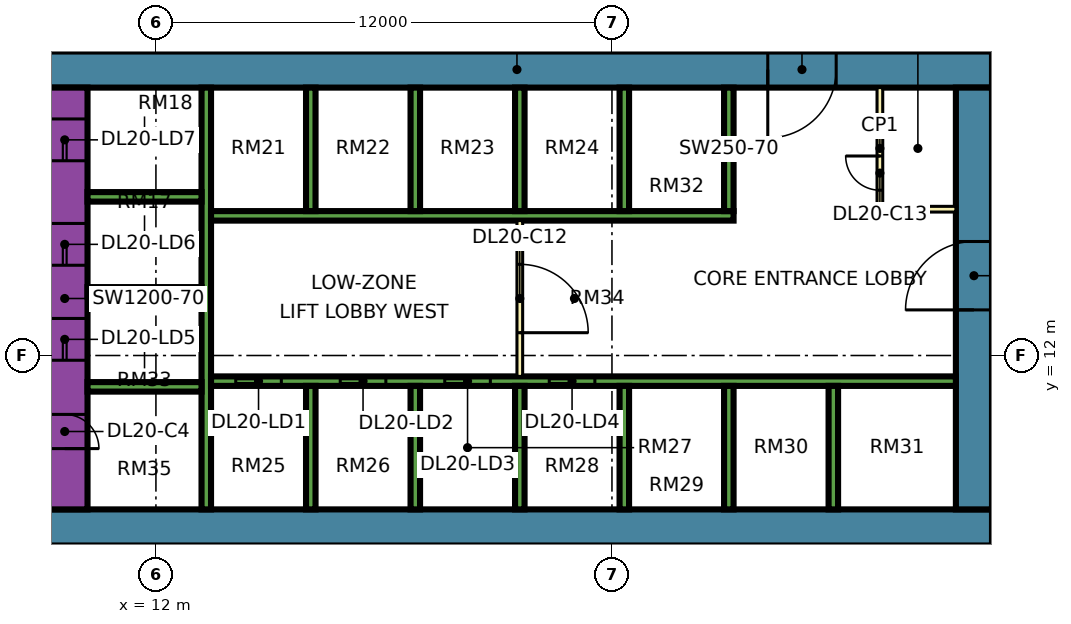
"""IFC4 building model, lengths in metres.
Left out: names, types, materials, properties, quantities, classifications, styles, units other than length and angle.
Written with IfcOpenShell. Run it as: python <this file> out.ifc"""

import sys

from ifc_helpers import new_model, si_unit, direction, frame, frame_2d, origin, place, context, subcontext, project, spatial, rectangle, extrude, element, fill, save


model = new_model("IFC4")
c1 = context("Model", 3, precision=1e-05, world=origin(), true_north=direction((0.0, 1.0)))
c2 = subcontext(c1, "Body", "Model", "MODEL_VIEW")
j1 = project(units=[si_unit("LENGTHUNIT", "METRE"), si_unit("PLANEANGLEUNIT", "RADIAN")], contexts=[c1])
p1 = place(None, origin())
s1 = spatial("IfcSite", under=j1, at=p1, CompositionType="ELEMENT")
p2 = place(p1, origin())
s2 = spatial("IfcBuilding", under=s1, at=p2, CompositionType="ELEMENT")
p3 = place(p2, frame((0.0, 0.0, 91.9)))
s3 = spatial("IfcBuildingStorey", under=s2, at=p3, CompositionType="ELEMENT", Elevation=91.9)
p4 = place(p3, frame((9.0, 7.475, 0.0), z_axis=(0.0, 0.0, 1.0), x_axis=(1.0, 0.0, 0.0)))
e1 = element("IfcWall", 1, at=p4, inside=s3, PredefinedType="SHEAR", context=c2, shape_type="SweptSolid", body=[
    extrude(rectangle(XDim=25.0, YDim=0.95, at=frame_2d((12.5, 0.0))), origin(), (0.0, 0.0, 1.0), 3.75),
])
p5 = place(p3, frame((9.0, 19.525, 0.0), z_axis=(0.0, 0.0, 1.0), x_axis=(1.0, 0.0, 0.0)))
e2 = element("IfcWall", 2, at=p5, inside=s3, PredefinedType="SHEAR", context=c2, shape_type="SweptSolid", body=[
    extrude(rectangle(XDim=25.0, YDim=0.95, at=frame_2d((12.5, 0.0))), origin(), (0.0, 0.0, 1.0), 3.75),
])
p6 = place(p5, frame((19.1, 0.0, 0.0)))
e3 = element("IfcOpeningElement", 3, at=p6, cuts=e2, PredefinedType="OPENING", context=c2, shape_type="SweptSolid", body=[
    extrude(rectangle(XDim=1.8, YDim=2.4, at=frame_2d((0.9, 1.2))), frame((0.0, 0.485, 0.0), z_axis=(0.0, -1.0, 0.0), x_axis=(1.0, 0.0, 0.0)), (0.0, 0.0, 1.0), 0.97),
])
p7 = place(p3, frame((9.6, 7.95, 0.0), z_axis=(0.0, 0.0, 1.0), x_axis=(0.0, 1.0, 0.0)))
e4 = element("IfcWall", 4, at=p7, inside=s3, PredefinedType="SHEAR", context=c2, shape_type="SweptSolid", body=[
    extrude(rectangle(XDim=11.1, YDim=1.2, at=frame_2d((5.55, 0.0))), origin(), (0.0, 0.0, 1.0), 3.75),
])
p8 = place(p7, frame((3.925, 0.0, 0.0)))
e5 = element("IfcOpeningElement", 5, at=p8, cuts=e4, PredefinedType="OPENING", context=c2, shape_type="SweptSolid", body=[
    extrude(rectangle(XDim=1.1, YDim=2.2, at=frame_2d((0.55, 1.1))), frame((0.0, 0.61, 0.0), z_axis=(0.0, -1.0, 0.0), x_axis=(1.0, 0.0, 0.0)), (0.0, 0.0, 1.0), 1.22),
])
p9 = place(p7, frame((6.425, 0.0, 0.0)))
e6 = element("IfcOpeningElement", 6, at=p9, cuts=e4, PredefinedType="OPENING", context=c2, shape_type="SweptSolid", body=[
    extrude(rectangle(XDim=1.1, YDim=2.2, at=frame_2d((0.55, 1.1))), frame((0.0, 0.61, 0.0), z_axis=(0.0, -1.0, 0.0), x_axis=(1.0, 0.0, 0.0)), (0.0, 0.0, 1.0), 1.22),
])
p10 = place(p7, frame((9.175, 0.0, 0.0)))
e7 = element("IfcOpeningElement", 7, at=p10, cuts=e4, PredefinedType="OPENING", context=c2, shape_type="SweptSolid", body=[
    extrude(rectangle(XDim=1.1, YDim=2.2, at=frame_2d((0.55, 1.1))), frame((0.0, 0.61, 0.0), z_axis=(0.0, -1.0, 0.0), x_axis=(1.0, 0.0, 0.0)), (0.0, 0.0, 1.0), 1.22),
])
p11 = place(p7, frame((1.6, 0.0, 0.0)))
e8 = element("IfcOpeningElement", 8, at=p11, cuts=e4, PredefinedType="OPENING", context=c2, shape_type="SweptSolid", body=[
    extrude(rectangle(XDim=0.9, YDim=2.1, at=frame_2d((0.45, 1.05))), frame((0.0, 0.61, 0.0), z_axis=(0.0, -1.0, 0.0), x_axis=(1.0, 0.0, 0.0)), (0.0, 0.0, 1.0), 1.22),
])
p12 = place(p3, frame((33.525, 7.95, 0.0), z_axis=(0.0, 0.0, 1.0), x_axis=(0.0, 1.0, 0.0)))
e9 = element("IfcWall", 9, at=p12, inside=s3, PredefinedType="SHEAR", context=c2, shape_type="SweptSolid", body=[
    extrude(rectangle(XDim=11.1, YDim=0.95, at=frame_2d((5.55, 0.0))), origin(), (0.0, 0.0, 1.0), 3.75),
])
p13 = place(p12, frame((5.25, 0.0, 0.0)))
e10 = element("IfcOpeningElement", 10, at=p13, cuts=e9, PredefinedType="OPENING", context=c2, shape_type="SweptSolid", body=[
    extrude(rectangle(XDim=1.8, YDim=2.4, at=frame_2d((0.9, 1.2))), frame((0.0, 0.485, 0.0), z_axis=(0.0, -1.0, 0.0), x_axis=(1.0, 0.0, 0.0)), (0.0, 0.0, 1.0), 0.97),
])
p14 = place(p3, frame((13.325, 7.95, 0.0), z_axis=(0.0, 0.0, 1.0), x_axis=(0.0, 1.0, 0.0)))
e11 = element("IfcWall", 11, at=p14, inside=s3, PredefinedType="SHEAR", context=c2, shape_type="SweptSolid", body=[
    extrude(rectangle(XDim=11.1, YDim=0.25, at=frame_2d((5.55, 0.0))), origin(), (0.0, 0.0, 1.0), 3.75),
])
p15 = place(p3, frame((13.45, 11.325, 0.0), z_axis=(0.0, 0.0, 1.0), x_axis=(1.0, 0.0, 0.0)))
e12 = element("IfcWall", 12, at=p15, inside=s3, PredefinedType="SHEAR", context=c2, shape_type="SweptSolid", body=[
    extrude(rectangle(XDim=19.6, YDim=0.25, at=frame_2d((9.8, 0.0))), origin(), (0.0, 0.0, 1.0), 3.75),
])
p16 = place(p15, frame((0.65, 0.0, 0.0)))
e13 = element("IfcOpeningElement", 13, at=p16, cuts=e12, PredefinedType="OPENING", context=c2, shape_type="SweptSolid", body=[
    extrude(rectangle(XDim=1.2, YDim=2.2, at=frame_2d((0.6, 1.1))), frame((0.0, 0.135, 0.0), z_axis=(0.0, -1.0, 0.0), x_axis=(1.0, 0.0, 0.0)), (0.0, 0.0, 1.0), 0.27),
])
p17 = place(p15, frame((3.4, 0.0, 0.0)))
e14 = element("IfcOpeningElement", 14, at=p17, cuts=e12, PredefinedType="OPENING", context=c2, shape_type="SweptSolid", body=[
    extrude(rectangle(XDim=1.2, YDim=2.2, at=frame_2d((0.6, 1.1))), frame((0.0, 0.135, 0.0), z_axis=(0.0, -1.0, 0.0), x_axis=(1.0, 0.0, 0.0)), (0.0, 0.0, 1.0), 0.27),
])
p18 = place(p15, frame((6.15, 0.0, 0.0)))
e15 = element("IfcOpeningElement", 15, at=p18, cuts=e12, PredefinedType="OPENING", context=c2, shape_type="SweptSolid", body=[
    extrude(rectangle(XDim=1.2, YDim=2.2, at=frame_2d((0.6, 1.1))), frame((0.0, 0.135, 0.0), z_axis=(0.0, -1.0, 0.0), x_axis=(1.0, 0.0, 0.0)), (0.0, 0.0, 1.0), 0.27),
])
p19 = place(p15, frame((8.9, 0.0, 0.0)))
e16 = element("IfcOpeningElement", 16, at=p19, cuts=e12, PredefinedType="OPENING", context=c2, shape_type="SweptSolid", body=[
    extrude(rectangle(XDim=1.2, YDim=2.2, at=frame_2d((0.6, 1.1))), frame((0.0, 0.135, 0.0), z_axis=(0.0, -1.0, 0.0), x_axis=(1.0, 0.0, 0.0)), (0.0, 0.0, 1.0), 0.27),
])
p20 = place(p3, frame((13.45, 15.675, 0.0), z_axis=(0.0, 0.0, 1.0), x_axis=(1.0, 0.0, 0.0)))
e17 = element("IfcWall", 17, at=p20, inside=s3, PredefinedType="SHEAR", context=c2, shape_type="SweptSolid", body=[
    extrude(rectangle(XDim=13.75, YDim=0.25, at=frame_2d((6.875, 0.0))), origin(), (0.0, 0.0, 1.0), 3.75),
])
for number, where, z_axis, x_axis in (
    (18, (10.2, 11.175, 0.0), (0.0, 0.0, 1.0), (1.0, 0.0, 0.0)),
    (19, (10.2, 13.675, 0.0), (0.0, 0.0, 1.0), (1.0, 0.0, 0.0)),
    (20, (10.2, 16.175, 0.0), (0.0, 0.0, 1.0), (1.0, 0.0, 0.0)),
):
    element("IfcWall", number, at=place(p3, frame(where, z_axis=z_axis, x_axis=x_axis)), inside=s3, PredefinedType="SHEAR", context=c2, shape_type="SweptSolid", body=[
        extrude(rectangle(XDim=3.0, YDim=0.25, at=frame_2d((1.5, 0.0))), origin(), (0.0, 0.0, 1.0), 3.75),
    ])
for number, where, z_axis, x_axis in (
    (21, (16.075, 7.95, 0.0), (0.0, 0.0, 1.0), (0.0, 1.0, 0.0)),
    (22, (18.825, 7.95, 0.0), (0.0, 0.0, 1.0), (0.0, 1.0, 0.0)),
    (23, (21.575, 7.95, 0.0), (0.0, 0.0, 1.0), (0.0, 1.0, 0.0)),
    (24, (24.325, 7.95, 0.0), (0.0, 0.0, 1.0), (0.0, 1.0, 0.0)),
    (25, (27.075, 7.95, 0.0), (0.0, 0.0, 1.0), (0.0, 1.0, 0.0)),
    (26, (29.825, 7.95, 0.0), (0.0, 0.0, 1.0), (0.0, 1.0, 0.0)),
    (27, (16.075, 15.8, 0.0), (0.0, 0.0, 1.0), (0.0, 1.0, 0.0)),
    (28, (18.825, 15.8, 0.0), (0.0, 0.0, 1.0), (0.0, 1.0, 0.0)),
    (29, (21.575, 15.8, 0.0), (0.0, 0.0, 1.0), (0.0, 1.0, 0.0)),
    (30, (24.325, 15.8, 0.0), (0.0, 0.0, 1.0), (0.0, 1.0, 0.0)),
    (31, (27.075, 15.8, 0.0), (0.0, 0.0, 1.0), (0.0, 1.0, 0.0)),
):
    element("IfcWall", number, at=place(p3, frame(where, z_axis=z_axis, x_axis=x_axis)), inside=s3, PredefinedType="SHEAR", context=c2, shape_type="SweptSolid", body=[
        extrude(rectangle(XDim=3.25, YDim=0.25, at=frame_2d((1.625, 0.0))), origin(), (0.0, 0.0, 1.0), 3.75),
    ])
p21 = place(p3, frame((-1.447, 12.553, 0.0), z_axis=(0.0, 0.0, 1.0), x_axis=(0.707106781187, -0.707106781187, 0.0)))
e32 = element("IfcWall", 32, at=p21, inside=s3, PredefinedType="SOLIDWALL", context=c2, shape_type="SweptSolid", body=[
    extrude(rectangle(XDim=19.799, YDim=0.15, at=frame_2d((9.899, 0.0))), origin(), (0.0, 0.0, 1.0), 3.35),
])
p22 = place(p21, frame((2.212, 0.0, 0.45)))
e33 = element("IfcOpeningElement", 33, at=p22, cuts=e32, PredefinedType="OPENING", context=c2, shape_type="SweptSolid", body=[
    extrude(rectangle(XDim=3.0, YDim=2.4, at=frame_2d((1.5, 1.2))), frame((0.0, 0.085, 0.0), z_axis=(0.0, -1.0, 0.0), x_axis=(1.0, 0.0, 0.0)), (0.0, 0.0, 1.0), 0.17),
])
p23 = place(p21, frame((10.216, 0.0, 0.45)))
e34 = element("IfcOpeningElement", 34, at=p23, cuts=e32, PredefinedType="OPENING", context=c2, shape_type="SweptSolid", body=[
    extrude(rectangle(XDim=3.0, YDim=2.4, at=frame_2d((1.5, 1.2))), frame((0.0, 0.085, 0.0), z_axis=(0.0, -1.0, 0.0), x_axis=(1.0, 0.0, 0.0)), (0.0, 0.0, 1.0), 0.17),
])
p24 = place(p3, frame((21.575, 11.45, 0.0), z_axis=(0.0, 0.0, 1.0), x_axis=(0.0, 1.0, 0.0)))
e35 = element("IfcWall", 35, at=p24, inside=s3, PredefinedType="PARTITIONING", context=c2, shape_type="SweptSolid", body=[
    extrude(rectangle(XDim=4.1, YDim=0.15, at=frame_2d((2.05, 0.0))), origin(), (0.0, 0.0, 1.0), 3.35),
])
p25 = place(p24, frame((1.15, 0.0, 0.0)))
e36 = element("IfcOpeningElement", 36, at=p25, cuts=e35, PredefinedType="OPENING", context=c2, shape_type="SweptSolid", body=[
    extrude(rectangle(XDim=1.8, YDim=2.4, at=frame_2d((0.9, 1.2))), frame((0.0, 0.085, 0.0), z_axis=(0.0, -1.0, 0.0), x_axis=(1.0, 0.0, 0.0)), (0.0, 0.0, 1.0), 0.17),
])
p26 = place(p3, frame((31.05, 15.85, 0.0), z_axis=(0.0, 0.0, 1.0), x_axis=(0.0, 1.0, 0.0)))
e37 = element("IfcWall", 37, at=p26, inside=s3, PredefinedType="PARTITIONING", context=c2, shape_type="SweptSolid", body=[
    extrude(rectangle(XDim=3.2, YDim=0.15, at=frame_2d((1.6, 0.0))), origin(), (0.0, 0.0, 1.0), 3.35),
])
p27 = place(p26, frame((0.5, 0.0, 0.0)))
e38 = element("IfcOpeningElement", 38, at=p27, cuts=e37, PredefinedType="OPENING", context=c2, shape_type="SweptSolid", body=[
    extrude(rectangle(XDim=0.9, YDim=2.1, at=frame_2d((0.45, 1.05))), frame((0.0, 0.085, 0.0), z_axis=(0.0, -1.0, 0.0), x_axis=(1.0, 0.0, 0.0)), (0.0, 0.0, 1.0), 0.17),
])
p28 = place(p3, frame((31.05, 15.85, 0.0), z_axis=(0.0, 0.0, 1.0), x_axis=(1.0, 0.0, 0.0)))
e39 = element("IfcWall", 39, at=p28, inside=s3, PredefinedType="PARTITIONING", context=c2, shape_type="SweptSolid", body=[
    extrude(rectangle(XDim=2.0, YDim=0.15, at=frame_2d((1.0, 0.0))), origin(), (0.0, 0.0, 1.0), 3.35),
])
p29 = place(p16, origin())
e40 = element("IfcDoor", 40, at=p29, inside=s3, OperationType="DOUBLE_DOOR_SLIDING", PredefinedType="DOOR", context=c2, shape_type="SweptSolid", body=[
    extrude(rectangle(XDim=1.2, YDim=2.2, at=frame_2d((0.6, 1.1))), frame((0.0, 0.025, 0.0), z_axis=(0.0, -1.0, 0.0), x_axis=(1.0, 0.0, 0.0)), (0.0, 0.0, 1.0), 0.05),
])
fill(e13, e40)
p30 = place(p17, origin())
e41 = element("IfcDoor", 41, at=p30, inside=s3, OperationType="DOUBLE_DOOR_SLIDING", PredefinedType="DOOR", context=c2, shape_type="SweptSolid", body=[
    extrude(rectangle(XDim=1.2, YDim=2.2, at=frame_2d((0.6, 1.1))), frame((0.0, 0.025, 0.0), z_axis=(0.0, -1.0, 0.0), x_axis=(1.0, 0.0, 0.0)), (0.0, 0.0, 1.0), 0.05),
])
fill(e14, e41)
p31 = place(p18, origin())
e42 = element("IfcDoor", 42, at=p31, inside=s3, OperationType="DOUBLE_DOOR_SLIDING", PredefinedType="DOOR", context=c2, shape_type="SweptSolid", body=[
    extrude(rectangle(XDim=1.2, YDim=2.2, at=frame_2d((0.6, 1.1))), frame((0.0, 0.025, 0.0), z_axis=(0.0, -1.0, 0.0), x_axis=(1.0, 0.0, 0.0)), (0.0, 0.0, 1.0), 0.05),
])
fill(e15, e42)
p32 = place(p19, origin())
e43 = element("IfcDoor", 43, at=p32, inside=s3, OperationType="DOUBLE_DOOR_SLIDING", PredefinedType="DOOR", context=c2, shape_type="SweptSolid", body=[
    extrude(rectangle(XDim=1.2, YDim=2.2, at=frame_2d((0.6, 1.1))), frame((0.0, 0.025, 0.0), z_axis=(0.0, -1.0, 0.0), x_axis=(1.0, 0.0, 0.0)), (0.0, 0.0, 1.0), 0.05),
])
fill(e16, e43)
p33 = place(p8, origin())
e44 = element("IfcDoor", 44, at=p33, inside=s3, OperationType="DOUBLE_DOOR_SLIDING", PredefinedType="DOOR", context=c2, shape_type="SweptSolid", body=[
    extrude(rectangle(XDim=1.1, YDim=2.2, at=frame_2d((0.55, 1.1))), frame((0.0, 0.025, 0.0), z_axis=(0.0, -1.0, 0.0), x_axis=(1.0, 0.0, 0.0)), (0.0, 0.0, 1.0), 0.05),
])
fill(e5, e44)
p34 = place(p9, origin())
e45 = element("IfcDoor", 45, at=p34, inside=s3, OperationType="DOUBLE_DOOR_SLIDING", PredefinedType="DOOR", context=c2, shape_type="SweptSolid", body=[
    extrude(rectangle(XDim=1.1, YDim=2.2, at=frame_2d((0.55, 1.1))), frame((0.0, 0.025, 0.0), z_axis=(0.0, -1.0, 0.0), x_axis=(1.0, 0.0, 0.0)), (0.0, 0.0, 1.0), 0.05),
])
fill(e6, e45)
p35 = place(p10, origin())
e46 = element("IfcDoor", 46, at=p35, inside=s3, OperationType="DOUBLE_DOOR_SLIDING", PredefinedType="DOOR", context=c2, shape_type="SweptSolid", body=[
    extrude(rectangle(XDim=1.1, YDim=2.2, at=frame_2d((0.55, 1.1))), frame((0.0, 0.025, 0.0), z_axis=(0.0, -1.0, 0.0), x_axis=(1.0, 0.0, 0.0)), (0.0, 0.0, 1.0), 0.05),
])
fill(e7, e46)
p36 = place(p13, origin())
e47 = element("IfcDoor", 47, at=p36, inside=s3, OperationType="DOUBLE_DOOR_SINGLE_SWING", PredefinedType="DOOR", context=c2, shape_type="SweptSolid", body=[
    extrude(rectangle(XDim=1.8, YDim=2.4, at=frame_2d((0.9, 1.2))), frame((0.0, 0.025, 0.0), z_axis=(0.0, -1.0, 0.0), x_axis=(1.0, 0.0, 0.0)), (0.0, 0.0, 1.0), 0.05),
])
fill(e10, e47)
p37 = place(p6, frame((1.8, 0.0, 0.0), z_axis=(0.0, 0.0, 1.0), x_axis=(-1.0, 0.0, 0.0)))
e48 = element("IfcDoor", 48, at=p37, inside=s3, OperationType="DOUBLE_DOOR_SINGLE_SWING", PredefinedType="DOOR", context=c2, shape_type="SweptSolid", body=[
    extrude(rectangle(XDim=1.8, YDim=2.4, at=frame_2d((0.9, 1.2))), frame((0.0, 0.025, 0.0), z_axis=(0.0, -1.0, 0.0), x_axis=(1.0, 0.0, 0.0)), (0.0, 0.0, 1.0), 0.05),
])
fill(e3, e48)
p38 = place(p11, frame((0.9, 0.0, 0.0), z_axis=(0.0, 0.0, 1.0), x_axis=(-1.0, 0.0, 0.0)))
e49 = element("IfcDoor", 49, at=p38, inside=s3, OperationType="SINGLE_SWING_LEFT", PredefinedType="DOOR", context=c2, shape_type="SweptSolid", body=[
    extrude(rectangle(XDim=0.9, YDim=2.1, at=frame_2d((0.45, 1.05))), frame((0.0, 0.025, 0.0), z_axis=(0.0, -1.0, 0.0), x_axis=(1.0, 0.0, 0.0)), (0.0, 0.0, 1.0), 0.05),
])
fill(e8, e49)
p39 = place(p25, frame((1.8, 0.0, 0.0), z_axis=(0.0, 0.0, 1.0), x_axis=(-1.0, 0.0, 0.0)))
e50 = element("IfcDoor", 50, at=p39, inside=s3, OperationType="DOUBLE_DOOR_SINGLE_SWING", PredefinedType="DOOR", context=c2, shape_type="SweptSolid", body=[
    extrude(rectangle(XDim=1.8, YDim=2.4, at=frame_2d((0.9, 1.2))), frame((0.0, 0.025, 0.0), z_axis=(0.0, -1.0, 0.0), x_axis=(1.0, 0.0, 0.0)), (0.0, 0.0, 1.0), 0.05),
])
fill(e36, e50)
p40 = place(p27, frame((0.9, 0.0, 0.0), z_axis=(0.0, 0.0, 1.0), x_axis=(-1.0, 0.0, 0.0)))
e51 = element("IfcDoor", 51, at=p40, inside=s3, OperationType="SINGLE_SWING_RIGHT", PredefinedType="DOOR", context=c2, shape_type="SweptSolid", body=[
    extrude(rectangle(XDim=0.9, YDim=2.1, at=frame_2d((0.45, 1.05))), frame((0.0, 0.025, 0.0), z_axis=(0.0, -1.0, 0.0), x_axis=(1.0, 0.0, 0.0)), (0.0, 0.0, 1.0), 0.05),
])
fill(e38, e51)
save(model, sys.argv[1])
